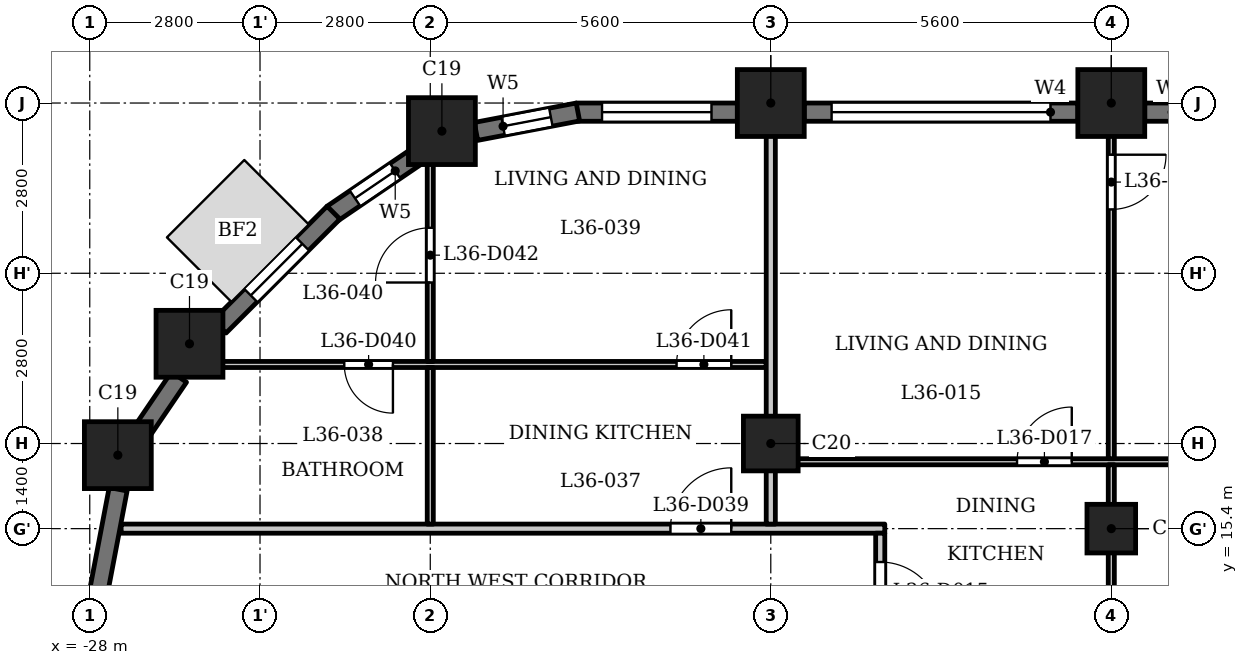
"""IFC4 building model, lengths in metres.
Left out: names, types, materials, properties, quantities, classifications, styles, units other than length and angle.
Written with IfcOpenShell. Run it as: python <this file> out.ifc"""

import sys

from ifc_helpers import new_model, si_unit, direction, frame, frame_2d, origin, origin_2d, place, context, subcontext, project, spatial, rectangle, extrude, element, fill, save


model = new_model("IFC4")
c1 = context("Model", 3, precision=1e-05, world=origin(), true_north=direction((0.0, 1.0)))
c2 = subcontext(c1, "Body", "Model", "MODEL_VIEW")
j1 = project(units=[si_unit("LENGTHUNIT", "METRE"), si_unit("PLANEANGLEUNIT", "RADIAN")], contexts=[c1])
p1 = place(None, origin())
s1 = spatial("IfcSite", under=j1, at=p1, CompositionType="ELEMENT")
p2 = place(p1, origin())
s2 = spatial("IfcBuilding", under=s1, at=p2, CompositionType="ELEMENT")
p3 = place(p2, frame((0.0, 0.0, 143.1)))
s3 = spatial("IfcBuildingStorey", under=s2, at=p3, CompositionType="ELEMENT", Elevation=143.1)
for number, where, z_axis, x_axis in (
    (1, (-11.2, 22.4, 0.0), (0.0, 0.0, 1.0), (1.0, 0.0, 0.0)),
    (2, (-16.8, 22.4, 0.0), (0.0, 0.0, 1.0), (1.0, 0.0, 0.0)),
    (3, (-22.209, 21.938, 0.0), (0.0, 0.0, 1.0), (1.0, 0.0, 0.0)),
    (4, (-26.36, 18.44, 0.0), (0.0, 0.0, 1.0), (1.0, 0.0, 0.0)),
    (5, (-27.538, 16.609, 0.0), (0.0, 0.0, 1.0), (1.0, 0.0, 0.0)),
):
    element("IfcColumn", number, at=place(p3, frame(where, z_axis=z_axis, x_axis=x_axis)), inside=s3, PredefinedType="COLUMN", context=c2, shape_type="SweptSolid", body=[
        extrude(rectangle(XDim=1.1, YDim=1.1, at=origin_2d()), origin(), (0.0, 0.0, 1.0), 3.5),
    ])
p4 = place(p3, frame((-16.8, 16.8, 0.0), z_axis=(0.0, 0.0, 1.0), x_axis=(1.0, 0.0, 0.0)))
e6 = element("IfcColumn", 6, at=p4, inside=s3, PredefinedType="COLUMN", context=c2, shape_type="SweptSolid", body=[
    extrude(rectangle(XDim=0.9, YDim=0.9, at=origin_2d()), origin(), (0.0, 0.0, 1.0), 3.5),
])
p5 = place(p3, frame((-11.2, 15.4, 0.0), z_axis=(0.0, 0.0, 1.0), x_axis=(1.0, 0.0, 0.0)))
e7 = element("IfcColumn", 7, at=p5, inside=s3, PredefinedType="COLUMN", context=c2, shape_type="SweptSolid", body=[
    extrude(rectangle(XDim=0.8, YDim=0.8, at=origin_2d()), origin(), (0.0, 0.0, 1.0), 3.5),
])
p6 = place(p3, frame((-6.15, 22.25, 0.0), z_axis=(0.0, 0.0, 1.0), x_axis=(-1.0, 0.0, 0.0)))
e8 = element("IfcWall", 8, at=p6, inside=s3, PredefinedType="SOLIDWALL", context=c2, shape_type="SweptSolid", body=[
    extrude(rectangle(XDim=4.5, YDim=0.3, at=frame_2d((2.25, 0.0))), origin(), (0.0, 0.0, 1.0), 2.45),
])
p7 = place(p6, frame((0.45, 0.0, 1.2)))
e9 = element("IfcOpeningElement", 9, at=p7, cuts=e8, PredefinedType="OPENING", context=c2, shape_type="SweptSolid", body=[
    extrude(rectangle(XDim=3.6, YDim=0.95, at=frame_2d((1.8, 0.475))), frame((0.0, 0.16, 0.0), z_axis=(0.0, -1.0, 0.0), x_axis=(1.0, 0.0, 0.0)), (0.0, 0.0, 1.0), 0.32),
])
p8 = place(p3, frame((-11.75, 22.25, 0.0), z_axis=(0.0, 0.0, 1.0), x_axis=(-1.0, 0.0, 0.0)))
e10 = element("IfcWall", 10, at=p8, inside=s3, PredefinedType="SOLIDWALL", context=c2, shape_type="SweptSolid", body=[
    extrude(rectangle(XDim=4.5, YDim=0.3, at=frame_2d((2.25, 0.0))), origin(), (0.0, 0.0, 1.0), 2.45),
])
p9 = place(p8, frame((0.45, 0.0, 1.2)))
e11 = element("IfcOpeningElement", 11, at=p9, cuts=e10, PredefinedType="OPENING", context=c2, shape_type="SweptSolid", body=[
    extrude(rectangle(XDim=3.6, YDim=0.95, at=frame_2d((1.8, 0.475))), frame((0.0, 0.16, 0.0), z_axis=(0.0, -1.0, 0.0), x_axis=(1.0, 0.0, 0.0)), (0.0, 0.0, 1.0), 0.32),
])
p10 = place(p3, frame((-17.35, 22.25, 0.0), z_axis=(0.0, 0.0, 1.0), x_axis=(-1.0, 0.0, 0.0)))
e12 = element("IfcWall", 12, at=p10, inside=s3, PredefinedType="SOLIDWALL", context=c2, shape_type="SweptSolid", body=[
    extrude(rectangle(XDim=2.65, YDim=0.3, at=frame_2d((1.325, 0.0))), origin(), (0.0, 0.0, 1.0), 2.45),
])
p11 = place(p10, frame((0.425, 0.0, 0.9)))
e13 = element("IfcOpeningElement", 13, at=p11, cuts=e12, PredefinedType="OPENING", context=c2, shape_type="SweptSolid", body=[
    extrude(rectangle(XDim=1.8, YDim=1.25, at=frame_2d((0.9, 0.625))), frame((0.0, 0.16, 0.0), z_axis=(0.0, -1.0, 0.0), x_axis=(1.0, 0.0, 0.0)), (0.0, 0.0, 1.0), 0.32),
])
p12 = place(p3, frame((-19.972, 22.253, 0.0), z_axis=(0.0, 0.0, 1.0), x_axis=(-0.982297206936, -0.187329114784, 0.0)))
e14 = element("IfcWall", 14, at=p12, inside=s3, PredefinedType="SOLIDWALL", context=c2, shape_type="SweptSolid", body=[
    extrude(rectangle(XDim=1.706, YDim=0.3, at=frame_2d((0.853, 0.0))), origin(), (0.0, 0.0, 1.0), 2.45),
])
p13 = place(p12, frame((0.453, 0.0, 0.6)))
e15 = element("IfcOpeningElement", 15, at=p13, cuts=e14, PredefinedType="OPENING", context=c2, shape_type="SweptSolid", body=[
    extrude(rectangle(XDim=0.8, YDim=1.55, at=frame_2d((0.4, 0.775))), frame((0.0, 0.16, 0.0), z_axis=(0.0, -1.0, 0.0), x_axis=(1.0, 0.0, 0.0)), (0.0, 0.0, 1.0), 0.32),
])
p14 = place(p3, frame((-22.602, 21.538, 0.0), z_axis=(0.0, 0.0, 1.0), x_axis=(-0.827040942766, -0.562141689424, 0.0)))
e16 = element("IfcWall", 16, at=p14, inside=s3, PredefinedType="SOLIDWALL", context=c2, shape_type="SweptSolid", body=[
    extrude(rectangle(XDim=1.706, YDim=0.3, at=frame_2d((0.853, 0.0))), origin(), (0.0, 0.0, 1.0), 2.45),
])
p15 = place(p14, frame((0.453, 0.0, 0.6)))
e17 = element("IfcOpeningElement", 17, at=p15, cuts=e16, PredefinedType="OPENING", context=c2, shape_type="SweptSolid", body=[
    extrude(rectangle(XDim=0.8, YDim=1.55, at=frame_2d((0.4, 0.775))), frame((0.0, 0.16, 0.0), z_axis=(0.0, -1.0, 0.0), x_axis=(1.0, 0.0, 0.0)), (0.0, 0.0, 1.0), 0.32),
])
p16 = place(p3, frame((-23.991, 20.597, 0.0), z_axis=(0.0, 0.0, 1.0), x_axis=(-0.707106781187, -0.707106781187, 0.0)))
e18 = element("IfcWall", 18, at=p16, inside=s3, PredefinedType="SOLIDWALL", context=c2, shape_type="SweptSolid", body=[
    extrude(rectangle(XDim=2.65, YDim=0.3, at=frame_2d((1.325, 0.0))), origin(), (0.0, 0.0, 1.0), 2.45),
])
p17 = place(p16, frame((0.725, 0.0, 0.6)))
e19 = element("IfcOpeningElement", 19, at=p17, cuts=e18, PredefinedType="OPENING", context=c2, shape_type="SweptSolid", body=[
    extrude(rectangle(XDim=1.2, YDim=1.55, at=frame_2d((0.6, 0.775))), frame((0.0, 0.16, 0.0), z_axis=(0.0, -1.0, 0.0), x_axis=(1.0, 0.0, 0.0)), (0.0, 0.0, 1.0), 0.32),
])
p18 = place(p3, frame((-26.532, 17.893, 0.0), z_axis=(0.0, 0.0, 1.0), x_axis=(-0.562105419172, -0.82706559458, 0.0)))
e20 = element("IfcWall", 20, at=p18, inside=s3, PredefinedType="SOLIDWALL", context=c2, shape_type="SweptSolid", body=[
    extrude(rectangle(XDim=1.077, YDim=0.3, at=frame_2d((0.539, 0.0))), origin(), (0.0, 0.0, 1.0), 3.2),
])
p19 = place(p3, frame((-27.533, 16.048, 0.0), z_axis=(0.0, 0.0, 1.0), x_axis=(-0.187302784601, -0.982302227871, 0.0)))
e21 = element("IfcWall", 21, at=p19, inside=s3, PredefinedType="SOLIDWALL", context=c2, shape_type="SweptSolid", body=[
    extrude(rectangle(XDim=1.706, YDim=0.3, at=frame_2d((0.853, 0.0))), origin(), (0.0, 0.0, 1.0), 2.45),
])
p20 = place(p3, frame((-27.484, 15.4, 0.0), z_axis=(0.0, 0.0, 1.0), x_axis=(1.0, 0.0, 0.0)))
e22 = element("IfcWall", 22, at=p20, inside=s3, PredefinedType="PARTITIONING", context=c2, shape_type="SweptSolid", body=[
    extrude(rectangle(XDim=12.559, YDim=0.15, at=frame_2d((6.279, 0.0))), origin(), (0.0, 0.0, 1.0), 3.2),
])
p21 = place(p20, frame((9.034, 0.0, 0.0)))
e23 = element("IfcOpeningElement", 23, at=p21, cuts=e22, PredefinedType="OPENING", context=c2, shape_type="SweptSolid", body=[
    extrude(rectangle(XDim=1.0, YDim=2.1, at=frame_2d((0.5, 1.05))), frame((0.0, 0.085, 0.0), z_axis=(0.0, -1.0, 0.0), x_axis=(1.0, 0.0, 0.0)), (0.0, 0.0, 1.0), 0.17),
])
p22 = place(p3, frame((-16.725, 16.5, 0.0), z_axis=(0.0, 0.0, 1.0), x_axis=(1.0, 0.0, 0.0)))
e24 = element("IfcWall", 24, at=p22, inside=s3, PredefinedType="PARTITIONING", context=c2, shape_type="SweptSolid", body=[
    extrude(rectangle(XDim=33.45, YDim=0.1, at=frame_2d((16.725, 0.0))), origin(), (0.0, 0.0, 1.0), 3.2),
])
p23 = place(p22, frame((9.675, 0.0, 0.0)))
e25 = element("IfcOpeningElement", 25, at=p23, cuts=e24, PredefinedType="OPENING", context=c2, shape_type="SweptSolid", body=[
    extrude(rectangle(XDim=0.8, YDim=2.1, at=frame_2d((0.4, 1.05))), frame((0.0, 0.06, 0.0), z_axis=(0.0, -1.0, 0.0), x_axis=(1.0, 0.0, 0.0)), (0.0, 0.0, 1.0), 0.12),
])
p24 = place(p22, frame((3.975, 0.0, 0.0)))
e26 = element("IfcOpeningElement", 26, at=p24, cuts=e24, PredefinedType="OPENING", context=c2, shape_type="SweptSolid", body=[
    extrude(rectangle(XDim=0.9, YDim=2.1, at=frame_2d((0.45, 1.05))), frame((0.0, 0.06, 0.0), z_axis=(0.0, -1.0, 0.0), x_axis=(1.0, 0.0, 0.0)), (0.0, 0.0, 1.0), 0.12),
])
p25 = place(p22, frame((12.025, 0.0, 0.0)))
e27 = element("IfcOpeningElement", 27, at=p25, cuts=e24, PredefinedType="OPENING", context=c2, shape_type="SweptSolid", body=[
    extrude(rectangle(XDim=0.8, YDim=2.1, at=frame_2d((0.4, 1.05))), frame((0.0, 0.06, 0.0), z_axis=(0.0, -1.0, 0.0), x_axis=(1.0, 0.0, 0.0)), (0.0, 0.0, 1.0), 0.12),
])
p26 = place(p22, frame((15.175, 0.0, 0.0)))
e28 = element("IfcOpeningElement", 28, at=p26, cuts=e24, PredefinedType="OPENING", context=c2, shape_type="SweptSolid", body=[
    extrude(rectangle(XDim=0.9, YDim=2.1, at=frame_2d((0.45, 1.05))), frame((0.0, 0.06, 0.0), z_axis=(0.0, -1.0, 0.0), x_axis=(1.0, 0.0, 0.0)), (0.0, 0.0, 1.0), 0.12),
])
p27 = place(p22, frame((20.975, 0.0, 0.0)))
e29 = element("IfcOpeningElement", 29, at=p27, cuts=e24, PredefinedType="OPENING", context=c2, shape_type="SweptSolid", body=[
    extrude(rectangle(XDim=0.8, YDim=2.1, at=frame_2d((0.4, 1.05))), frame((0.0, 0.06, 0.0), z_axis=(0.0, -1.0, 0.0), x_axis=(1.0, 0.0, 0.0)), (0.0, 0.0, 1.0), 0.12),
])
p28 = place(p22, frame((18.175, 0.0, 0.0)))
e30 = element("IfcOpeningElement", 30, at=p28, cuts=e24, PredefinedType="OPENING", context=c2, shape_type="SweptSolid", body=[
    extrude(rectangle(XDim=0.9, YDim=2.1, at=frame_2d((0.45, 1.05))), frame((0.0, 0.06, 0.0), z_axis=(0.0, -1.0, 0.0), x_axis=(1.0, 0.0, 0.0)), (0.0, 0.0, 1.0), 0.12),
])
p29 = place(p22, frame((23.725, 0.0, 0.0)))
e31 = element("IfcOpeningElement", 31, at=p29, cuts=e24, PredefinedType="OPENING", context=c2, shape_type="SweptSolid", body=[
    extrude(rectangle(XDim=0.8, YDim=2.1, at=frame_2d((0.4, 1.05))), frame((0.0, 0.06, 0.0), z_axis=(0.0, -1.0, 0.0), x_axis=(1.0, 0.0, 0.0)), (0.0, 0.0, 1.0), 0.12),
])
p30 = place(p22, frame((26.125, 0.0, 0.0)))
e32 = element("IfcOpeningElement", 32, at=p30, cuts=e24, PredefinedType="OPENING", context=c2, shape_type="SweptSolid", body=[
    extrude(rectangle(XDim=0.9, YDim=2.1, at=frame_2d((0.45, 1.05))), frame((0.0, 0.06, 0.0), z_axis=(0.0, -1.0, 0.0), x_axis=(1.0, 0.0, 0.0)), (0.0, 0.0, 1.0), 0.12),
])
p31 = place(p22, frame((32.125, 0.0, 0.0)))
e33 = element("IfcOpeningElement", 33, at=p31, cuts=e24, PredefinedType="OPENING", context=c2, shape_type="SweptSolid", body=[
    extrude(rectangle(XDim=0.8, YDim=2.1, at=frame_2d((0.4, 1.05))), frame((0.0, 0.06, 0.0), z_axis=(0.0, -1.0, 0.0), x_axis=(1.0, 0.0, 0.0)), (0.0, 0.0, 1.0), 0.12),
])
p32 = place(p22, frame((28.975, 0.0, 0.0)))
e34 = element("IfcOpeningElement", 34, at=p32, cuts=e24, PredefinedType="OPENING", context=c2, shape_type="SweptSolid", body=[
    extrude(rectangle(XDim=0.9, YDim=2.1, at=frame_2d((0.45, 1.05))), frame((0.0, 0.06, 0.0), z_axis=(0.0, -1.0, 0.0), x_axis=(1.0, 0.0, 0.0)), (0.0, 0.0, 1.0), 0.12),
])
p33 = place(p3, frame((-26.44, 18.1, 0.0), z_axis=(0.0, 0.0, 1.0), x_axis=(1.0, 0.0, 0.0)))
e35 = element("IfcWall", 35, at=p33, inside=s3, PredefinedType="PARTITIONING", context=c2, shape_type="SweptSolid", body=[
    extrude(rectangle(XDim=9.565, YDim=0.1, at=frame_2d((4.782, 0.0))), origin(), (0.0, 0.0, 1.0), 3.2),
])
p34 = place(p33, frame((2.626, 0.0, 0.0)))
e36 = element("IfcOpeningElement", 36, at=p34, cuts=e35, PredefinedType="OPENING", context=c2, shape_type="SweptSolid", body=[
    extrude(rectangle(XDim=0.8, YDim=2.1, at=frame_2d((0.4, 1.05))), frame((0.0, 0.06, 0.0), z_axis=(0.0, -1.0, 0.0), x_axis=(1.0, 0.0, 0.0)), (0.0, 0.0, 1.0), 0.12),
])
p35 = place(p33, frame((8.09, 0.0, 0.0)))
e37 = element("IfcOpeningElement", 37, at=p35, cuts=e35, PredefinedType="OPENING", context=c2, shape_type="SweptSolid", body=[
    extrude(rectangle(XDim=0.9, YDim=2.1, at=frame_2d((0.45, 1.05))), frame((0.0, 0.06, 0.0), z_axis=(0.0, -1.0, 0.0), x_axis=(1.0, 0.0, 0.0)), (0.0, 0.0, 1.0), 0.12),
])
p36 = place(p3, frame((-22.4, 15.475, 0.0), z_axis=(0.0, 0.0, 1.0), x_axis=(0.0, 1.0, 0.0)))
e38 = element("IfcWall", 38, at=p36, inside=s3, PredefinedType="PARTITIONING", context=c2, shape_type="SweptSolid", body=[
    extrude(rectangle(XDim=2.575, YDim=0.1, at=frame_2d((1.288, 0.0))), origin(), (0.0, 0.0, 1.0), 3.2),
])
p37 = place(p3, frame((-22.4, 18.15, 0.0), z_axis=(0.0, 0.0, 1.0), x_axis=(0.0, 1.0, 0.0)))
e39 = element("IfcWall", 39, at=p37, inside=s3, PredefinedType="PARTITIONING", context=c2, shape_type="SweptSolid", body=[
    extrude(rectangle(XDim=3.57, YDim=0.1, at=frame_2d((1.785, 0.0))), origin(), (0.0, 0.0, 1.0), 3.2),
])
p38 = place(p37, frame((1.298, 0.0, 0.0)))
e40 = element("IfcOpeningElement", 40, at=p38, cuts=e39, PredefinedType="OPENING", context=c2, shape_type="SweptSolid", body=[
    extrude(rectangle(XDim=0.9, YDim=2.1, at=frame_2d((0.45, 1.05))), frame((0.0, 0.06, 0.0), z_axis=(0.0, -1.0, 0.0), x_axis=(1.0, 0.0, 0.0)), (0.0, 0.0, 1.0), 0.12),
])
p39 = place(p3, frame((-16.8, 15.475, 0.0), z_axis=(0.0, 0.0, 1.0), x_axis=(0.0, 1.0, 0.0)))
e41 = element("IfcWall", 41, at=p39, inside=s3, PredefinedType="PARTITIONING", context=c2, shape_type="SweptSolid", body=[
    extrude(rectangle(XDim=7.455, YDim=0.15, at=frame_2d((3.728, 0.0))), origin(), (0.0, 0.0, 1.0), 3.2),
])
p40 = place(p3, frame((-15.0, 13.275, 0.0), z_axis=(0.0, 0.0, 1.0), x_axis=(0.0, 1.0, 0.0)))
e42 = element("IfcWall", 42, at=p40, inside=s3, PredefinedType="PARTITIONING", context=c2, shape_type="SweptSolid", body=[
    extrude(rectangle(XDim=2.05, YDim=0.15, at=frame_2d((1.025, 0.0))), origin(), (0.0, 0.0, 1.0), 3.2),
])
p41 = place(p40, frame((0.576, 0.0, 0.0)))
e43 = element("IfcOpeningElement", 43, at=p41, cuts=e42, PredefinedType="OPENING", context=c2, shape_type="SweptSolid", body=[
    extrude(rectangle(XDim=1.0, YDim=2.1, at=frame_2d((0.5, 1.05))), frame((0.0, 0.085, 0.0), z_axis=(0.0, -1.0, 0.0), x_axis=(1.0, 0.0, 0.0)), (0.0, 0.0, 1.0), 0.17),
])
p42 = place(p3, frame((-11.2, 13.275, 0.0), z_axis=(0.0, 0.0, 1.0), x_axis=(0.0, 1.0, 0.0)))
e44 = element("IfcWall", 44, at=p42, inside=s3, PredefinedType="PARTITIONING", context=c2, shape_type="SweptSolid", body=[
    extrude(rectangle(XDim=3.175, YDim=0.1, at=frame_2d((1.587, 0.0))), origin(), (0.0, 0.0, 1.0), 3.2),
])
p43 = place(p3, frame((-11.2, 16.55, 0.0), z_axis=(0.0, 0.0, 1.0), x_axis=(0.0, 1.0, 0.0)))
e45 = element("IfcWall", 45, at=p43, inside=s3, PredefinedType="PARTITIONING", context=c2, shape_type="SweptSolid", body=[
    extrude(rectangle(XDim=6.38, YDim=0.1, at=frame_2d((3.19, 0.0))), origin(), (0.0, 0.0, 1.0), 3.2),
])
p44 = place(p43, frame((4.1, 0.0, 0.0)))
e46 = element("IfcOpeningElement", 46, at=p44, cuts=e45, PredefinedType="OPENING", context=c2, shape_type="SweptSolid", body=[
    extrude(rectangle(XDim=0.9, YDim=2.1, at=frame_2d((0.45, 1.05))), frame((0.0, 0.06, 0.0), z_axis=(0.0, -1.0, 0.0), x_axis=(1.0, 0.0, 0.0)), (0.0, 0.0, 1.0), 0.12),
])
p45 = place(p41, origin())
e47 = element("IfcDoor", 47, at=p45, inside=s3, OperationType="SINGLE_SWING_LEFT", PredefinedType="DOOR", context=c2, shape_type="SweptSolid", body=[
    extrude(rectangle(XDim=1.0, YDim=2.1, at=frame_2d((0.5, 1.05))), frame((0.0, 0.025, 0.0), z_axis=(0.0, -1.0, 0.0), x_axis=(1.0, 0.0, 0.0)), (0.0, 0.0, 1.0), 0.05),
])
fill(e43, e47)
p46 = place(p24, origin())
e48 = element("IfcDoor", 48, at=p46, inside=s3, OperationType="SINGLE_SWING_LEFT", PredefinedType="DOOR", context=c2, shape_type="SweptSolid", body=[
    extrude(rectangle(XDim=0.9, YDim=2.1, at=frame_2d((0.45, 1.05))), frame((0.0, 0.025, 0.0), z_axis=(0.0, -1.0, 0.0), x_axis=(1.0, 0.0, 0.0)), (0.0, 0.0, 1.0), 0.05),
])
fill(e26, e48)
p47 = place(p44, origin())
e49 = element("IfcDoor", 49, at=p47, inside=s3, OperationType="SINGLE_SWING_RIGHT", PredefinedType="DOOR", context=c2, shape_type="SweptSolid", body=[
    extrude(rectangle(XDim=0.9, YDim=2.1, at=frame_2d((0.45, 1.05))), frame((0.0, 0.025, 0.0), z_axis=(0.0, -1.0, 0.0), x_axis=(1.0, 0.0, 0.0)), (0.0, 0.0, 1.0), 0.05),
])
fill(e46, e49)
p48 = place(p21, origin())
e50 = element("IfcDoor", 50, at=p48, inside=s3, OperationType="SINGLE_SWING_LEFT", PredefinedType="DOOR", context=c2, shape_type="SweptSolid", body=[
    extrude(rectangle(XDim=1.0, YDim=2.1, at=frame_2d((0.5, 1.05))), frame((0.0, 0.025, 0.0), z_axis=(0.0, -1.0, 0.0), x_axis=(1.0, 0.0, 0.0)), (0.0, 0.0, 1.0), 0.05),
])
fill(e23, e50)
p49 = place(p34, origin())
e51 = element("IfcDoor", 51, at=p49, inside=s3, OperationType="SINGLE_SWING_RIGHT", PredefinedType="DOOR", context=c2, shape_type="SweptSolid", body=[
    extrude(rectangle(XDim=0.8, YDim=2.1, at=frame_2d((0.4, 1.05))), frame((0.0, 0.025, 0.0), z_axis=(0.0, -1.0, 0.0), x_axis=(1.0, 0.0, 0.0)), (0.0, 0.0, 1.0), 0.05),
])
fill(e36, e51)
p50 = place(p35, origin())
e52 = element("IfcDoor", 52, at=p50, inside=s3, OperationType="SINGLE_SWING_LEFT", PredefinedType="DOOR", context=c2, shape_type="SweptSolid", body=[
    extrude(rectangle(XDim=0.9, YDim=2.1, at=frame_2d((0.45, 1.05))), frame((0.0, 0.025, 0.0), z_axis=(0.0, -1.0, 0.0), x_axis=(1.0, 0.0, 0.0)), (0.0, 0.0, 1.0), 0.05),
])
fill(e37, e52)
p51 = place(p38, origin())
e53 = element("IfcDoor", 53, at=p51, inside=s3, OperationType="SINGLE_SWING_RIGHT", PredefinedType="DOOR", context=c2, shape_type="SweptSolid", body=[
    extrude(rectangle(XDim=0.9, YDim=2.1, at=frame_2d((0.45, 1.05))), frame((0.0, 0.025, 0.0), z_axis=(0.0, -1.0, 0.0), x_axis=(1.0, 0.0, 0.0)), (0.0, 0.0, 1.0), 0.05),
])
fill(e40, e53)
p52 = place(p9, origin())
e54 = element("IfcWindow", 54, at=p52, inside=s3, PartitioningType="SINGLE_PANEL", PredefinedType="WINDOW", context=c2, shape_type="SweptSolid", body=[
    extrude(rectangle(XDim=3.6, YDim=0.95, at=frame_2d((1.8, 0.475))), frame((0.0, 0.03, 0.0), z_axis=(0.0, -1.0, 0.0), x_axis=(1.0, 0.0, 0.0)), (0.0, 0.0, 1.0), 0.06),
])
fill(e11, e54)
p53 = place(p11, origin())
e55 = element("IfcWindow", 55, at=p53, inside=s3, PartitioningType="SINGLE_PANEL", PredefinedType="WINDOW", context=c2, shape_type="SweptSolid", body=[
    extrude(rectangle(XDim=1.8, YDim=1.25, at=frame_2d((0.9, 0.625))), frame((0.0, 0.03, 0.0), z_axis=(0.0, -1.0, 0.0), x_axis=(1.0, 0.0, 0.0)), (0.0, 0.0, 1.0), 0.06),
])
fill(e13, e55)
p54 = place(p13, origin())
e56 = element("IfcWindow", 56, at=p54, inside=s3, PartitioningType="SINGLE_PANEL", PredefinedType="WINDOW", context=c2, shape_type="SweptSolid", body=[
    extrude(rectangle(XDim=0.8, YDim=1.55, at=frame_2d((0.4, 0.775))), frame((0.0, 0.03, 0.0), z_axis=(0.0, -1.0, 0.0), x_axis=(1.0, 0.0, 0.0)), (0.0, 0.0, 1.0), 0.06),
])
fill(e15, e56)
p55 = place(p15, origin())
e57 = element("IfcWindow", 57, at=p55, inside=s3, PartitioningType="SINGLE_PANEL", PredefinedType="WINDOW", context=c2, shape_type="SweptSolid", body=[
    extrude(rectangle(XDim=0.8, YDim=1.55, at=frame_2d((0.4, 0.775))), frame((0.0, 0.03, 0.0), z_axis=(0.0, -1.0, 0.0), x_axis=(1.0, 0.0, 0.0)), (0.0, 0.0, 1.0), 0.06),
])
fill(e17, e57)
p56 = place(p17, origin())
e58 = element("IfcWindow", 58, at=p56, inside=s3, PartitioningType="SINGLE_PANEL", PredefinedType="WINDOW", context=c2, shape_type="SweptSolid", body=[
    extrude(rectangle(XDim=1.2, YDim=1.55, at=frame_2d((0.6, 0.775))), frame((0.0, 0.03, 0.0), z_axis=(0.0, -1.0, 0.0), x_axis=(1.0, 0.0, 0.0)), (0.0, 0.0, 1.0), 0.06),
])
fill(e19, e58)
save(model, sys.argv[1])
